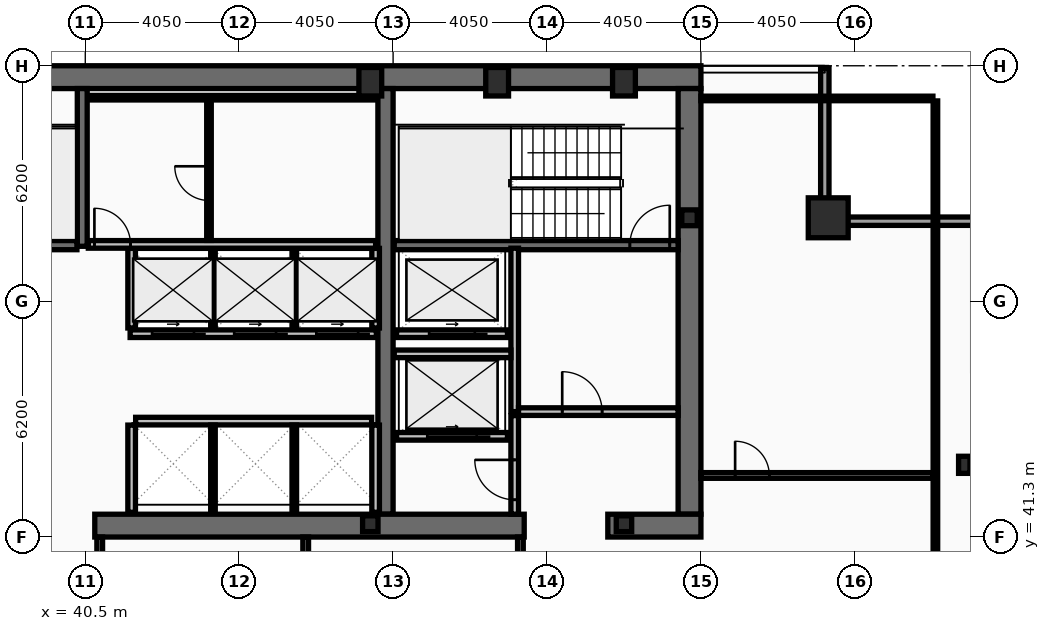
"""IFC4 building model, lengths in metres.
Left out: names, types, materials, properties, quantities, classifications, styles, units other than length and angle.
Written with IfcOpenShell. Run it as: python <this file> out.ifc"""

import sys

from ifc_helpers import new_model, si_unit, direction, frame, frame_2d, origin, origin_2d, place, context, subcontext, project, spatial, rectangle, hollow_rectangle, i_section, extrude, element, fill, save


model = new_model("IFC4")
c1 = context("Model", 3, precision=1e-05, world=origin(), true_north=direction((0.0, 1.0)))
c2 = subcontext(c1, "Body", "Model", "MODEL_VIEW")
j1 = project(units=[si_unit("LENGTHUNIT", "METRE"), si_unit("PLANEANGLEUNIT", "RADIAN")], contexts=[c1])
p1 = place(None, origin())
s1 = spatial("IfcSite", under=j1, at=p1, CompositionType="ELEMENT")
p2 = place(p1, origin())
s2 = spatial("IfcBuilding", under=s1, at=p2, CompositionType="ELEMENT")
p3 = place(p2, frame((0.0, 0.0, 242.6)))
s3 = spatial("IfcBuildingStorey", under=s2, at=p3, CompositionType="ELEMENT", Elevation=242.6)
p4 = place(p3, frame((16.2, 53.4, 0.0), z_axis=(0.0, 0.0, 1.0), x_axis=(1.0, 0.0, 0.0)))
e1 = element("IfcWall", 1, at=p4, inside=s3, PredefinedType="SHEAR", context=c2, shape_type="SweptSolid", body=[
    extrude(rectangle(XDim=40.5, YDim=0.6, at=frame_2d((20.25, 0.0))), origin(), (0.0, 0.0, 1.0), 3.44),
])
p5 = place(p3, frame((56.4, 53.1, 0.0), z_axis=(0.0, 0.0, 1.0), x_axis=(0.0, -1.0, 0.0)))
e2 = element("IfcWall", 2, at=p5, inside=s3, PredefinedType="SHEAR", context=c2, shape_type="SweptSolid", body=[
    extrude(rectangle(XDim=11.2, YDim=0.6, at=frame_2d((5.6, 0.0))), origin(), (0.0, 0.0, 1.0), 3.44),
])
p6 = place(p3, frame((48.4, 41.9, 0.0), z_axis=(0.0, 0.0, 1.0), x_axis=(0.0, 1.0, 0.0)))
e3 = element("IfcWall", 3, at=p6, inside=s3, PredefinedType="SHEAR", context=c2, shape_type="SweptSolid", body=[
    extrude(rectangle(XDim=11.2, YDim=0.4, at=frame_2d((5.6, 0.0))), origin(), (0.0, 0.0, 1.0), 3.44),
])
p7 = place(p3, frame((52.05, 41.6, 0.0), z_axis=(0.0, 0.0, 1.0), x_axis=(-1.0, 0.0, 0.0)))
e4 = element("IfcWall", 4, at=p7, inside=s3, PredefinedType="SHEAR", context=c2, shape_type="SweptSolid", body=[
    extrude(rectangle(XDim=11.3, YDim=0.6, at=frame_2d((5.65, 0.0))), origin(), (0.0, 0.0, 1.0), 3.44),
])
p8 = place(p3, frame((56.7, 41.6, 0.0), z_axis=(0.0, 0.0, 1.0), x_axis=(-1.0, 0.0, 0.0)))
e5 = element("IfcWall", 5, at=p8, inside=s3, PredefinedType="SHEAR", context=c2, shape_type="SweptSolid", body=[
    extrude(rectangle(XDim=2.45, YDim=0.6, at=frame_2d((1.225, 0.0))), origin(), (0.0, 0.0, 1.0), 3.44),
])
p9 = place(p3, frame((40.42, 48.95, 0.0), z_axis=(0.0, 0.0, 1.0), x_axis=(0.0, 1.0, 0.0)))
e6 = element("IfcWall", 6, at=p9, inside=s3, PredefinedType="SHEAR", context=c2, shape_type="SweptSolid", body=[
    extrude(rectangle(XDim=4.15, YDim=0.26, at=frame_2d((2.075, 0.0))), origin(), (0.0, 0.0, 1.0), 3.44),
])
p10 = place(p3, frame((48.63, 48.98, 0.0), z_axis=(0.0, 0.0, 1.0), x_axis=(1.0, 0.0, 0.0)))
e7 = element("IfcWall", 7, at=p10, inside=s3, PredefinedType="SHEAR", context=c2, shape_type="SweptSolid", body=[
    extrude(rectangle(XDim=7.47, YDim=0.24, at=frame_2d((3.735, 0.0))), origin(), (0.0, 0.0, 1.0), 3.44),
])
p11 = place(p10, frame((6.2, 0.0, 0.0)))
e8 = element("IfcOpeningElement", 8, at=p11, cuts=e7, PredefinedType="OPENING", context=c2, shape_type="SweptSolid", body=[
    extrude(rectangle(XDim=1.05, YDim=2.15, at=frame_2d((0.525, 1.075))), frame((0.0, 0.13, 0.0), z_axis=(0.0, -1.0, 0.0), x_axis=(1.0, 0.0, 0.0)), (0.0, 0.0, 1.0), 0.26),
])
p12 = place(p3, frame((32.72, 48.98, 0.0), z_axis=(0.0, 0.0, 1.0), x_axis=(1.0, 0.0, 0.0)))
e9 = element("IfcWall", 9, at=p12, inside=s3, PredefinedType="SHEAR", context=c2, shape_type="SweptSolid", body=[
    extrude(rectangle(XDim=7.56, YDim=0.24, at=frame_2d((3.78, 0.0))), origin(), (0.0, 0.0, 1.0), 3.44),
])
p13 = place(p12, frame((0.22, 0.0, 0.0)))
e10 = element("IfcOpeningElement", 10, at=p13, cuts=e9, PredefinedType="OPENING", context=c2, shape_type="SweptSolid", body=[
    extrude(rectangle(XDim=1.05, YDim=2.15, at=frame_2d((0.525, 1.075))), frame((0.0, 0.13, 0.0), z_axis=(0.0, -1.0, 0.0), x_axis=(1.0, 0.0, 0.0)), (0.0, 0.0, 1.0), 0.26),
])
p14 = place(p3, frame((60.05, 49.7, 0.0), z_axis=(0.0, 0.0, 1.0), x_axis=(1.0, 0.0, 0.0)))
e11 = element("IfcColumn", 11, at=p14, inside=s3, PredefinedType="COLUMN", context=c2, shape_type="SweptSolid", body=[
    extrude(hollow_rectangle(XDim=1.05, YDim=1.05, WallThickness=0.055, at=origin_2d()), origin(), (0.0, 0.0, 1.0), 3.6),
])
for number, where, z_axis, x_axis in (
    (12, (48.0, 53.28, 0.0), (0.0, 0.0, 1.0), (1.0, 0.0, 0.0)),
    (13, (51.337, 53.28, 0.0), (0.0, 0.0, 1.0), (1.0, 0.0, 0.0)),
    (14, (54.675, 53.28, 0.0), (0.0, 0.0, 1.0), (1.0, 0.0, 0.0)),
):
    element("IfcColumn", number, at=place(p3, frame(where, z_axis=z_axis, x_axis=x_axis)), inside=s3, PredefinedType="COLUMN", context=c2, shape_type="SweptSolid", body=[
        extrude(hollow_rectangle(XDim=0.6, YDim=0.75, WallThickness=0.045, at=origin_2d()), origin(), (0.0, 0.0, 1.0), 3.6),
    ])
p15 = place(p3, frame((63.63, 43.2, 0.0), z_axis=(0.0, 0.0, 1.0), x_axis=(1.0, 0.0, 0.0)))
e15 = element("IfcColumn", 15, at=p15, inside=s3, PredefinedType="COLUMN", context=c2, shape_type="SweptSolid", body=[
    extrude(i_section(OverallWidth=0.3, OverallDepth=0.45, WebThickness=0.014, FlangeThickness=0.026, at=origin_2d()), origin(), (0.0, 0.0, 1.0), 3.6),
])
for number, where, z_axis, x_axis in (
    (16, (56.4, 49.7, 0.0), (0.0, 0.0, 1.0), (1.0, 0.0, 0.0)),
    (17, (48.0, 41.65, 0.0), (0.0, 0.0, 1.0), (1.0, 0.0, 0.0)),
    (18, (54.675, 41.65, 0.0), (0.0, 0.0, 1.0), (1.0, 0.0, 0.0)),
):
    element("IfcColumn", number, at=place(p3, frame(where, z_axis=z_axis, x_axis=x_axis)), inside=s3, PredefinedType="COLUMN", context=c2, shape_type="SweptSolid", body=[
        extrude(i_section(OverallWidth=0.406, OverallDepth=0.416, WebThickness=0.03, FlangeThickness=0.048, at=origin_2d()), origin(), (0.0, 0.0, 1.0), 3.6),
    ])
p16 = place(p3, frame((59.96, 53.63, 0.0), z_axis=(0.0, 0.0, 1.0), x_axis=(0.0, -1.0, 0.0)))
e19 = element("IfcWall", 19, at=p16, inside=s3, PredefinedType="SOLIDWALL", context=c2, shape_type="SweptSolid", body=[
    extrude(rectangle(XDim=3.91, YDim=0.22, at=frame_2d((1.955, 0.0))), origin(), (0.0, 0.0, 1.0), 2.83),
])
p17 = place(p3, frame((59.85, 49.61, 0.0), z_axis=(0.0, 0.0, 1.0), x_axis=(1.0, 0.0, 0.0)))
e20 = element("IfcWall", 20, at=p17, inside=s3, PredefinedType="SOLIDWALL", context=c2, shape_type="SweptSolid", body=[
    extrude(rectangle(XDim=4.22, YDim=0.22, at=frame_2d((2.11, 0.0))), origin(), (0.0, 0.0, 1.0), 2.83),
])
p18 = place(p3, frame((51.61, 43.95, 0.0), z_axis=(0.0, 0.0, 1.0), x_axis=(-1.0, 0.0, 0.0)))
e21 = element("IfcWall", 21, at=p18, inside=s3, PredefinedType="PARTITIONING", context=c2, shape_type="SweptSolid", body=[
    extrude(rectangle(XDim=2.92, YDim=0.2, at=frame_2d((1.46, 0.0))), origin(), (0.0, 0.0, 1.0), 3.44),
])
p19 = place(p18, frame((0.81, 0.0, 0.0)))
e22 = element("IfcOpeningElement", 22, at=p19, cuts=e21, PredefinedType="OPENING", context=c2, shape_type="SweptSolid", body=[
    extrude(rectangle(XDim=1.3, YDim=2.18, at=frame_2d((0.65, 1.09))), frame((0.0, 0.11, 0.0), z_axis=(0.0, -1.0, 0.0), x_axis=(1.0, 0.0, 0.0)), (0.0, 0.0, 1.0), 0.22),
])
p20 = place(p3, frame((51.61, 46.65, 0.0), z_axis=(0.0, 0.0, 1.0), x_axis=(-1.0, 0.0, 0.0)))
e23 = element("IfcWall", 23, at=p20, inside=s3, PredefinedType="PARTITIONING", context=c2, shape_type="SweptSolid", body=[
    extrude(rectangle(XDim=2.92, YDim=0.2, at=frame_2d((1.46, 0.0))), origin(), (0.0, 0.0, 1.0), 3.44),
])
p21 = place(p20, frame((0.86, 0.0, 0.0)))
e24 = element("IfcOpeningElement", 24, at=p21, cuts=e23, PredefinedType="OPENING", context=c2, shape_type="SweptSolid", body=[
    extrude(rectangle(XDim=1.2, YDim=2.18, at=frame_2d((0.6, 1.09))), frame((0.0, 0.11, 0.0), z_axis=(0.0, -1.0, 0.0), x_axis=(1.0, 0.0, 0.0)), (0.0, 0.0, 1.0), 0.22),
])
p22 = place(p3, frame((48.16, 46.65, 0.0), z_axis=(0.0, 0.0, 1.0), x_axis=(-1.0, 0.0, 0.0)))
e25 = element("IfcWall", 25, at=p22, inside=s3, PredefinedType="PARTITIONING", context=c2, shape_type="SweptSolid", body=[
    extrude(rectangle(XDim=6.48, YDim=0.2, at=frame_2d((3.24, 0.0))), origin(), (0.0, 0.0, 1.0), 3.44),
])
p23 = place(p22, frame((4.8, 0.0, 0.0)))
e26 = element("IfcOpeningElement", 26, at=p23, cuts=e25, PredefinedType="OPENING", context=c2, shape_type="SweptSolid", body=[
    extrude(rectangle(XDim=1.1, YDim=2.18, at=frame_2d((0.55, 1.09))), frame((0.0, 0.11, 0.0), z_axis=(0.0, -1.0, 0.0), x_axis=(1.0, 0.0, 0.0)), (0.0, 0.0, 1.0), 0.22),
])
p24 = place(p22, frame((2.64, 0.0, 0.0)))
e27 = element("IfcOpeningElement", 27, at=p24, cuts=e25, PredefinedType="OPENING", context=c2, shape_type="SweptSolid", body=[
    extrude(rectangle(XDim=1.1, YDim=2.18, at=frame_2d((0.55, 1.09))), frame((0.0, 0.11, 0.0), z_axis=(0.0, -1.0, 0.0), x_axis=(1.0, 0.0, 0.0)), (0.0, 0.0, 1.0), 0.22),
])
p25 = place(p22, frame((0.48, 0.0, 0.0)))
e28 = element("IfcOpeningElement", 28, at=p25, cuts=e25, PredefinedType="OPENING", context=c2, shape_type="SweptSolid", body=[
    extrude(rectangle(XDim=1.1, YDim=2.18, at=frame_2d((0.55, 1.09))), frame((0.0, 0.11, 0.0), z_axis=(0.0, -1.0, 0.0), x_axis=(1.0, 0.0, 0.0)), (0.0, 0.0, 1.0), 0.22),
])
p26 = place(p3, frame((51.8, 44.6, 0.0), z_axis=(0.0, 0.0, 1.0), x_axis=(0.0, 1.0, 0.0)))
e29 = element("IfcWall", 29, at=p26, inside=s3, PredefinedType="PARTITIONING", context=c2, shape_type="SweptSolid", body=[
    extrude(rectangle(XDim=4.3, YDim=0.2, at=frame_2d((2.15, 0.0))), origin(), (0.0, 0.0, 1.0), 3.44),
])
p27 = place(p3, frame((51.9, 44.6, 0.0), z_axis=(0.0, 0.0, 1.0), x_axis=(1.0, 0.0, 0.0)))
e30 = element("IfcWall", 30, at=p27, inside=s3, PredefinedType="PARTITIONING", context=c2, shape_type="SweptSolid", body=[
    extrude(rectangle(XDim=4.2, YDim=0.2, at=frame_2d((2.1, 0.0))), origin(), (0.0, 0.0, 1.0), 3.44),
])
p28 = place(p27, frame((1.15, 0.0, 0.0)))
e31 = element("IfcOpeningElement", 31, at=p28, cuts=e30, PredefinedType="OPENING", context=c2, shape_type="SweptSolid", body=[
    extrude(rectangle(XDim=1.05, YDim=2.15, at=frame_2d((0.525, 1.075))), frame((0.0, 0.11, 0.0), z_axis=(0.0, -1.0, 0.0), x_axis=(1.0, 0.0, 0.0)), (0.0, 0.0, 1.0), 0.22),
])
p29 = place(p3, frame((48.63, 46.12, 0.0), z_axis=(0.0, 0.0, 1.0), x_axis=(1.0, 0.0, 0.0)))
e32 = element("IfcWall", 32, at=p29, inside=s3, PredefinedType="PARTITIONING", context=c2, shape_type="SweptSolid", body=[
    extrude(rectangle(XDim=3.07, YDim=0.2, at=frame_2d((1.535, 0.0))), origin(), (0.0, 0.0, 1.0), 3.44),
])
p30 = place(p3, frame((51.8, 41.9, 0.0), z_axis=(0.0, 0.0, 1.0), x_axis=(0.0, 1.0, 0.0)))
e33 = element("IfcWall", 33, at=p30, inside=s3, PredefinedType="PARTITIONING", context=c2, shape_type="SweptSolid", body=[
    extrude(rectangle(XDim=2.595, YDim=0.2, at=frame_2d((1.298, 0.0))), origin(), (0.0, 0.0, 1.0), 3.44),
])
p31 = place(p30, frame((0.38, 0.0, 0.0)))
e34 = element("IfcOpeningElement", 34, at=p31, cuts=e33, PredefinedType="OPENING", context=c2, shape_type="SweptSolid", body=[
    extrude(rectangle(XDim=1.05, YDim=2.15, at=frame_2d((0.525, 1.075))), frame((0.0, 0.11, 0.0), z_axis=(0.0, -1.0, 0.0), x_axis=(1.0, 0.0, 0.0)), (0.0, 0.0, 1.0), 0.22),
])
for number, where, z_axis, x_axis in (
    (35, (41.72, 46.8, 0.0), (0.0, 0.0, 1.0), (0.0, 1.0, 0.0)),
    (36, (48.14, 46.8, 0.0), (0.0, 0.0, 1.0), (0.0, 1.0, 0.0)),
):
    element("IfcWall", number, at=place(p3, frame(where, z_axis=z_axis, x_axis=x_axis)), inside=s3, PredefinedType="PARTITIONING", context=c2, shape_type="SweptSolid", body=[
        extrude(rectangle(XDim=2.095, YDim=0.2, at=frame_2d((1.047, 0.0))), origin(), (0.0, 0.0, 1.0), 3.44),
    ])
for number, where, z_axis, x_axis in (
    (37, (43.86, 46.8, 0.0), (0.0, 0.0, 1.0), (0.0, 1.0, 0.0)),
    (38, (46.0, 46.8, 0.0), (0.0, 0.0, 1.0), (0.0, 1.0, 0.0)),
):
    element("IfcWall", number, at=place(p3, frame(where, z_axis=z_axis, x_axis=x_axis)), inside=s3, PredefinedType="PARTITIONING", context=c2, shape_type="SweptSolid", body=[
        extrude(rectangle(XDim=2.095, YDim=0.12, at=frame_2d((1.047, 0.0))), origin(), (0.0, 0.0, 1.0), 3.44),
    ])
p32 = place(p3, frame((41.825, 44.35, 0.0), z_axis=(0.0, 0.0, 1.0), x_axis=(1.0, 0.0, 0.0)))
e39 = element("IfcWall", 39, at=p32, inside=s3, PredefinedType="PARTITIONING", context=c2, shape_type="SweptSolid", body=[
    extrude(rectangle(XDim=6.21, YDim=0.2, at=frame_2d((3.105, 0.0))), origin(), (0.0, 0.0, 1.0), 3.44),
])
for number, where, z_axis, x_axis in (
    (40, (41.72, 41.95, 0.0), (0.0, 0.0, 1.0), (0.0, 1.0, 0.0)),
    (41, (48.14, 41.95, 0.0), (0.0, 0.0, 1.0), (0.0, 1.0, 0.0)),
):
    element("IfcWall", number, at=place(p3, frame(where, z_axis=z_axis, x_axis=x_axis)), inside=s3, PredefinedType="PARTITIONING", context=c2, shape_type="SweptSolid", body=[
        extrude(rectangle(XDim=2.295, YDim=0.2, at=frame_2d((1.147, 0.0))), origin(), (0.0, 0.0, 1.0), 3.44),
    ])
for number, where, z_axis, x_axis in (
    (42, (43.86, 41.95, 0.0), (0.0, 0.0, 1.0), (0.0, 1.0, 0.0)),
    (43, (46.0, 41.95, 0.0), (0.0, 0.0, 1.0), (0.0, 1.0, 0.0)),
):
    element("IfcWall", number, at=place(p3, frame(where, z_axis=z_axis, x_axis=x_axis)), inside=s3, PredefinedType="PARTITIONING", context=c2, shape_type="SweptSolid", body=[
        extrude(rectangle(XDim=2.295, YDim=0.12, at=frame_2d((1.147, 0.0))), origin(), (0.0, 0.0, 1.0), 3.44),
    ])
p33 = place(p3, frame((40.58, 52.86, 0.0), z_axis=(0.0, 0.0, 1.0), x_axis=(1.0, 0.0, 0.0)))
e44 = element("IfcWall", 44, at=p33, inside=s3, PredefinedType="PARTITIONING", context=c2, shape_type="SweptSolid", body=[
    extrude(rectangle(XDim=7.56, YDim=0.12, at=frame_2d((3.78, 0.0))), origin(), (0.0, 0.0, 1.0), 3.44),
])
p34 = place(p3, frame((40.58, 49.0, 0.0), z_axis=(0.0, 0.0, 1.0), x_axis=(1.0, 0.0, 0.0)))
e45 = element("IfcWall", 45, at=p34, inside=s3, PredefinedType="PARTITIONING", context=c2, shape_type="SweptSolid", body=[
    extrude(rectangle(XDim=7.56, YDim=0.2, at=frame_2d((3.78, 0.0))), origin(), (0.0, 0.0, 1.0), 3.44),
])
p35 = place(p34, frame((0.16, 0.0, 0.0)))
e46 = element("IfcOpeningElement", 46, at=p35, cuts=e45, PredefinedType="OPENING", context=c2, shape_type="SweptSolid", body=[
    extrude(rectangle(XDim=0.95, YDim=2.1, at=frame_2d((0.475, 1.05))), frame((0.0, 0.11, 0.0), z_axis=(0.0, -1.0, 0.0), x_axis=(1.0, 0.0, 0.0)), (0.0, 0.0, 1.0), 0.22),
])
p36 = place(p3, frame((43.755, 49.105, 0.0), z_axis=(0.0, 0.0, 1.0), x_axis=(0.0, 1.0, 0.0)))
e47 = element("IfcWall", 47, at=p36, inside=s3, PredefinedType="PARTITIONING", context=c2, shape_type="SweptSolid", body=[
    extrude(rectangle(XDim=3.69, YDim=0.12, at=frame_2d((1.845, 0.0))), origin(), (0.0, 0.0, 1.0), 3.44),
])
p37 = place(p36, frame((1.05, 0.0, 0.0)))
e48 = element("IfcOpeningElement", 48, at=p37, cuts=e47, PredefinedType="OPENING", context=c2, shape_type="SweptSolid", body=[
    extrude(rectangle(XDim=0.9, YDim=2.05, at=frame_2d((0.45, 1.025))), frame((0.0, 0.07, 0.0), z_axis=(0.0, -1.0, 0.0), x_axis=(1.0, 0.0, 0.0)), (0.0, 0.0, 1.0), 0.14),
])
for number, where, z_axis, x_axis in (
    (49, (40.88, 38.28, 0.0), (0.0, 0.0, 1.0), (0.0, 1.0, 0.0)),
    (50, (46.3, 38.28, 0.0), (0.0, 0.0, 1.0), (0.0, 1.0, 0.0)),
    (51, (51.95, 38.28, 0.0), (0.0, 0.0, 1.0), (0.0, 1.0, 0.0)),
):
    element("IfcWall", number, at=place(p3, frame(where, z_axis=z_axis, x_axis=x_axis)), inside=s3, PredefinedType="PARTITIONING", context=c2, shape_type="SweptSolid", body=[
        extrude(rectangle(XDim=3.02, YDim=0.15, at=frame_2d((1.51, 0.0))), origin(), (0.0, 0.0, 1.0), 3.44),
    ])
p38 = place(p3, frame((56.7, 42.92, 0.0), z_axis=(0.0, 0.0, 1.0), x_axis=(1.0, 0.0, 0.0)))
e52 = element("IfcWall", 52, at=p38, inside=s3, PredefinedType="PARTITIONING", context=c2, shape_type="SweptSolid", body=[
    extrude(rectangle(XDim=6.105, YDim=0.15, at=frame_2d((3.052, 0.0))), origin(), (0.0, 0.0, 1.0), 2.78),
])
p39 = place(p38, frame((0.9, 0.0, 0.0)))
e53 = element("IfcOpeningElement", 53, at=p39, cuts=e52, PredefinedType="OPENING", context=c2, shape_type="SweptSolid", body=[
    extrude(rectangle(XDim=0.9, YDim=2.05, at=frame_2d((0.45, 1.025))), frame((0.0, 0.085, 0.0), z_axis=(0.0, -1.0, 0.0), x_axis=(1.0, 0.0, 0.0)), (0.0, 0.0, 1.0), 0.17),
])
p40 = place(p3, frame((62.87, 10.665, 0.0), z_axis=(0.0, 0.0, 1.0), x_axis=(0.0, 1.0, 0.0)))
e54 = element("IfcWall", 54, at=p40, inside=s3, PredefinedType="PARTITIONING", context=c2, shape_type="SweptSolid", body=[
    extrude(rectangle(XDim=42.11, YDim=0.12, at=frame_2d((21.055, 0.0))), origin(), (0.0, 0.0, 1.0), 2.78),
])
p41 = place(p3, frame((56.7, 52.84, 0.0), z_axis=(0.0, 0.0, 1.0), x_axis=(1.0, 0.0, 0.0)))
e55 = element("IfcWall", 55, at=p41, inside=s3, PredefinedType="PARTITIONING", context=c2, shape_type="SweptSolid", body=[
    extrude(rectangle(XDim=6.105, YDim=0.12, at=frame_2d((3.052, 0.0))), origin(), (0.0, 0.0, 1.0), 3.44),
])
p42 = place(p11, origin())
e56 = element("IfcDoor", 56, at=p42, inside=s3, OperationType="SINGLE_SWING_RIGHT", PredefinedType="DOOR", context=c2, shape_type="SweptSolid", body=[
    extrude(rectangle(XDim=1.05, YDim=2.15, at=frame_2d((0.525, 1.075))), frame((0.0, 0.025, 0.0), z_axis=(0.0, -1.0, 0.0), x_axis=(1.0, 0.0, 0.0)), (0.0, 0.0, 1.0), 0.05),
])
fill(e8, e56)
p43 = place(p19, origin())
e57 = element("IfcDoor", 57, at=p43, inside=s3, OperationType="SLIDING_TO_LEFT", PredefinedType="DOOR", context=c2, shape_type="SweptSolid", body=[
    extrude(rectangle(XDim=1.3, YDim=2.18, at=frame_2d((0.65, 1.09))), frame((0.0, 0.025, 0.0), z_axis=(0.0, -1.0, 0.0), x_axis=(1.0, 0.0, 0.0)), (0.0, 0.0, 1.0), 0.05),
])
fill(e22, e57)
p44 = place(p21, origin())
e58 = element("IfcDoor", 58, at=p44, inside=s3, OperationType="SLIDING_TO_LEFT", PredefinedType="DOOR", context=c2, shape_type="SweptSolid", body=[
    extrude(rectangle(XDim=1.2, YDim=2.18, at=frame_2d((0.6, 1.09))), frame((0.0, 0.025, 0.0), z_axis=(0.0, -1.0, 0.0), x_axis=(1.0, 0.0, 0.0)), (0.0, 0.0, 1.0), 0.05),
])
fill(e24, e58)
p45 = place(p23, origin())
e59 = element("IfcDoor", 59, at=p45, inside=s3, OperationType="SLIDING_TO_LEFT", PredefinedType="DOOR", context=c2, shape_type="SweptSolid", body=[
    extrude(rectangle(XDim=1.1, YDim=2.18, at=frame_2d((0.55, 1.09))), frame((0.0, 0.025, 0.0), z_axis=(0.0, -1.0, 0.0), x_axis=(1.0, 0.0, 0.0)), (0.0, 0.0, 1.0), 0.05),
])
fill(e26, e59)
p46 = place(p24, origin())
e60 = element("IfcDoor", 60, at=p46, inside=s3, OperationType="SLIDING_TO_LEFT", PredefinedType="DOOR", context=c2, shape_type="SweptSolid", body=[
    extrude(rectangle(XDim=1.1, YDim=2.18, at=frame_2d((0.55, 1.09))), frame((0.0, 0.025, 0.0), z_axis=(0.0, -1.0, 0.0), x_axis=(1.0, 0.0, 0.0)), (0.0, 0.0, 1.0), 0.05),
])
fill(e27, e60)
p47 = place(p25, origin())
e61 = element("IfcDoor", 61, at=p47, inside=s3, OperationType="SLIDING_TO_LEFT", PredefinedType="DOOR", context=c2, shape_type="SweptSolid", body=[
    extrude(rectangle(XDim=1.1, YDim=2.18, at=frame_2d((0.55, 1.09))), frame((0.0, 0.025, 0.0), z_axis=(0.0, -1.0, 0.0), x_axis=(1.0, 0.0, 0.0)), (0.0, 0.0, 1.0), 0.05),
])
fill(e28, e61)
p48 = place(p28, origin())
e62 = element("IfcDoor", 62, at=p48, inside=s3, OperationType="SINGLE_SWING_LEFT", PredefinedType="DOOR", context=c2, shape_type="SweptSolid", body=[
    extrude(rectangle(XDim=1.05, YDim=2.15, at=frame_2d((0.525, 1.075))), frame((0.0, 0.025, 0.0), z_axis=(0.0, -1.0, 0.0), x_axis=(1.0, 0.0, 0.0)), (0.0, 0.0, 1.0), 0.05),
])
fill(e31, e62)
p49 = place(p31, origin())
e63 = element("IfcDoor", 63, at=p49, inside=s3, OperationType="SINGLE_SWING_RIGHT", PredefinedType="DOOR", context=c2, shape_type="SweptSolid", body=[
    extrude(rectangle(XDim=1.05, YDim=2.15, at=frame_2d((0.525, 1.075))), frame((0.0, 0.025, 0.0), z_axis=(0.0, -1.0, 0.0), x_axis=(1.0, 0.0, 0.0)), (0.0, 0.0, 1.0), 0.05),
])
fill(e34, e63)
p50 = place(p35, origin())
e64 = element("IfcDoor", 64, at=p50, inside=s3, OperationType="SINGLE_SWING_LEFT", PredefinedType="DOOR", context=c2, shape_type="SweptSolid", body=[
    extrude(rectangle(XDim=0.95, YDim=2.1, at=frame_2d((0.475, 1.05))), frame((0.0, 0.025, 0.0), z_axis=(0.0, -1.0, 0.0), x_axis=(1.0, 0.0, 0.0)), (0.0, 0.0, 1.0), 0.05),
])
fill(e46, e64)
p51 = place(p37, origin())
e65 = element("IfcDoor", 65, at=p51, inside=s3, OperationType="SINGLE_SWING_RIGHT", PredefinedType="DOOR", context=c2, shape_type="SweptSolid", body=[
    extrude(rectangle(XDim=0.9, YDim=2.05, at=frame_2d((0.45, 1.025))), frame((0.0, 0.025, 0.0), z_axis=(0.0, -1.0, 0.0), x_axis=(1.0, 0.0, 0.0)), (0.0, 0.0, 1.0), 0.05),
])
fill(e48, e65)
p52 = place(p39, origin())
e66 = element("IfcDoor", 66, at=p52, inside=s3, OperationType="SINGLE_SWING_LEFT", PredefinedType="DOOR", context=c2, shape_type="SweptSolid", body=[
    extrude(rectangle(XDim=0.9, YDim=2.05, at=frame_2d((0.45, 1.025))), frame((0.0, 0.025, 0.0), z_axis=(0.0, -1.0, 0.0), x_axis=(1.0, 0.0, 0.0)), (0.0, 0.0, 1.0), 0.05),
])
fill(e53, e66)
save(model, sys.argv[1])
